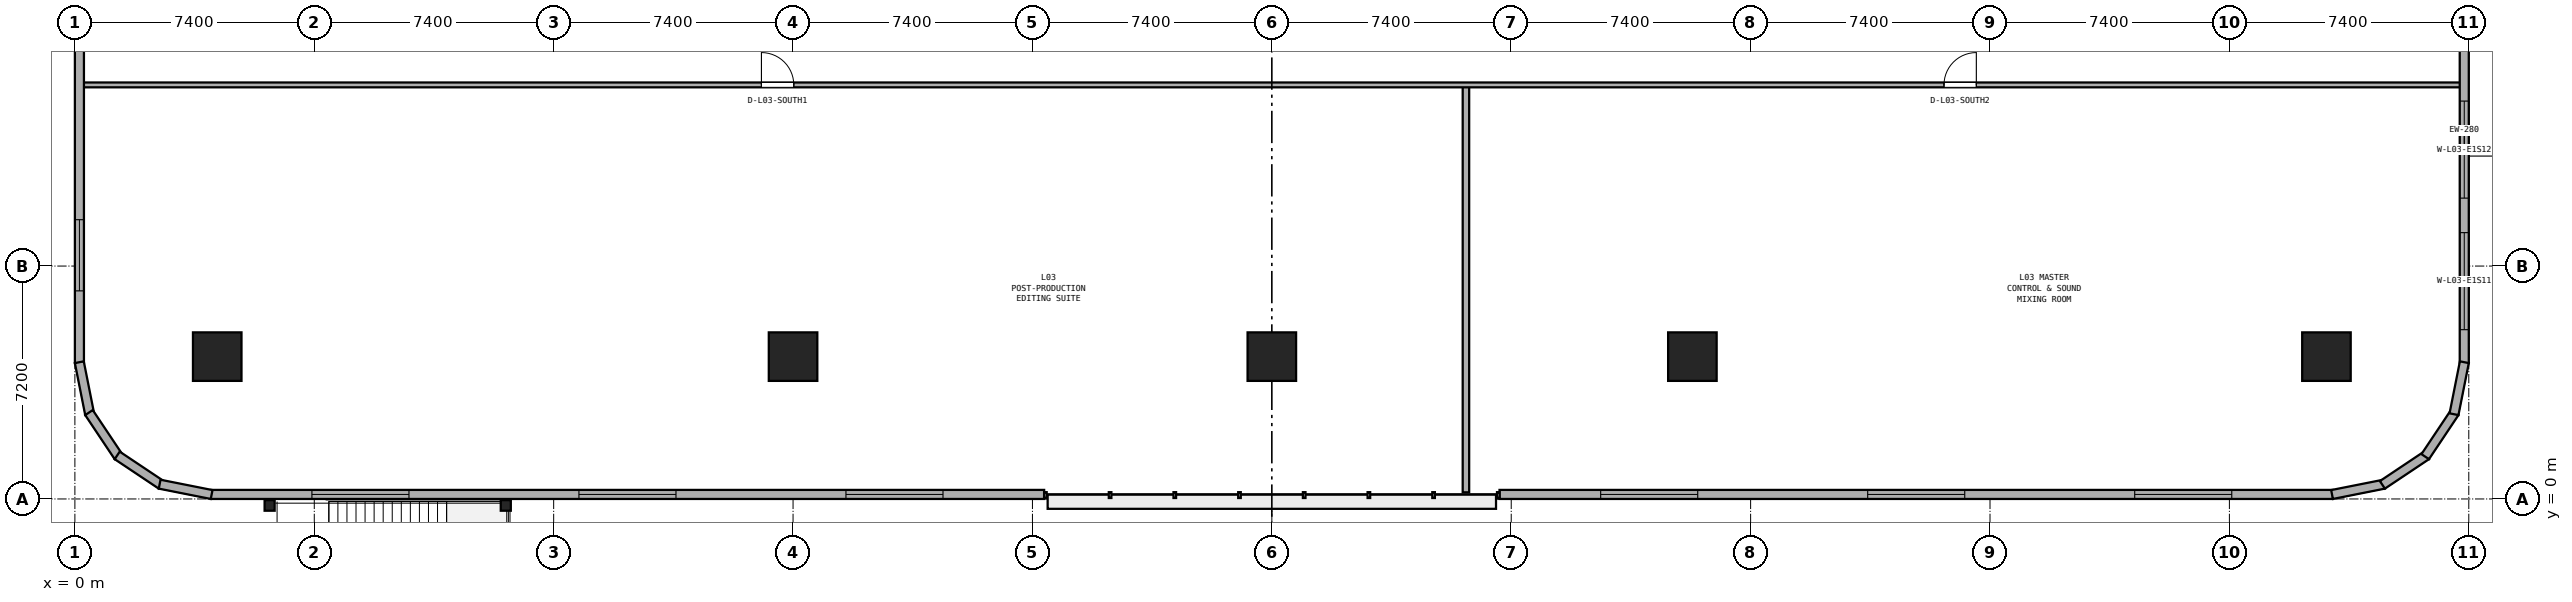
"""IFC4 building model, lengths in metres.
Left out: names, types, materials, properties, quantities, classifications, styles, units other than length and angle.
Written with IfcOpenShell. Run it as: python <this file> out.ifc"""

import sys

from ifc_helpers import new_model, si_unit, direction, frame, frame_2d, origin, origin_2d, place, context, subcontext, project, spatial, rectangle, i_section, extrude, element, fill, save


model = new_model("IFC4")
c1 = context("Model", 3, precision=1e-05, world=origin(), true_north=direction((0.0, 1.0)))
c2 = subcontext(c1, "Body", "Model", "MODEL_VIEW")
j1 = project(units=[si_unit("LENGTHUNIT", "METRE"), si_unit("PLANEANGLEUNIT", "RADIAN")], contexts=[c1])
p1 = place(None, origin())
s1 = spatial("IfcSite", under=j1, at=p1, CompositionType="ELEMENT")
p2 = place(p1, origin())
s2 = spatial("IfcBuilding", under=s1, at=p2, CompositionType="ELEMENT")
p3 = place(p2, frame((0.0, 0.0, 15.0)))
s3 = spatial("IfcBuildingStorey", under=s2, at=p3, CompositionType="ELEMENT", Elevation=15.0)
for number, where, z_axis, x_axis in (
    (1, (4.4, 4.4, 0.0), (0.0, 0.0, 1.0), (1.0, 0.0, 0.0)),
    (2, (22.2, 4.4, 0.0), (0.0, 0.0, 1.0), (1.0, 0.0, 0.0)),
    (3, (37.0, 4.4, 0.0), (0.0, 0.0, 1.0), (1.0, 0.0, 0.0)),
    (4, (50.0, 4.4, 0.0), (0.0, 0.0, 1.0), (1.0, 0.0, 0.0)),
    (5, (69.6, 4.4, 0.0), (0.0, 0.0, 1.0), (1.0, 0.0, 0.0)),
):
    element("IfcColumn", number, at=place(p3, frame(where, z_axis=z_axis, x_axis=x_axis)), inside=s3, PredefinedType="COLUMN", context=c2, shape_type="SweptSolid", body=[
        extrude(rectangle(XDim=1.5, YDim=1.5, at=origin_2d()), origin(), (0.0, 0.0, 1.0), 5.0),
    ])
for number, where, z_axis, x_axis in (
    (6, (6.02, -0.2, 0.0), (0.0, 0.0, 1.0), (1.0, 0.0, 0.0)),
    (7, (13.32, -0.2, 0.0), (0.0, 0.0, 1.0), (1.0, 0.0, 0.0)),
):
    element("IfcColumn", number, at=place(p3, frame(where, z_axis=z_axis, x_axis=x_axis)), inside=s3, PredefinedType="COLUMN", context=c2, shape_type="SweptSolid", body=[
        extrude(i_section(OverallWidth=0.311, OverallDepth=0.327, WebThickness=0.016, FlangeThickness=0.025, at=origin_2d()), origin(), (0.0, 0.0, 1.0), 5.0),
    ])
p4 = place(p3, frame((43.0, 0.205, 0.0), z_axis=(0.0, 0.0, 1.0), x_axis=(0.0, 1.0, 0.0)))
e8 = element("IfcWall", 8, at=p4, inside=s3, PredefinedType="PARTITIONING", context=c2, shape_type="SweptSolid", body=[
    extrude(rectangle(XDim=12.595, YDim=0.2, at=frame_2d((6.297, 0.0))), origin(), (0.0, 0.0, 1.0), 4.68),
])
p5 = place(p3, frame((0.205, 12.8, 0.0), z_axis=(0.0, 0.0, 1.0), x_axis=(1.0, 0.0, 0.0)))
e9 = element("IfcWall", 9, at=p5, inside=s3, PredefinedType="PARTITIONING", context=c2, shape_type="SweptSolid", body=[
    extrude(rectangle(XDim=73.59, YDim=0.15, at=frame_2d((36.795, 0.0))), origin(), (0.0, 0.0, 1.0), 4.68),
])
p6 = place(p5, frame((21.018, 0.0, 0.0)))
e10 = element("IfcOpeningElement", 10, at=p6, cuts=e9, PredefinedType="OPENING", context=c2, shape_type="SweptSolid", body=[
    extrude(rectangle(XDim=1.0, YDim=2.12, at=frame_2d((0.5, 1.06))), frame((0.0, 0.085, 0.0), z_axis=(0.0, -1.0, 0.0), x_axis=(1.0, 0.0, 0.0)), (0.0, 0.0, 1.0), 0.17),
])
p7 = place(p5, frame((57.573, 0.0, 0.0)))
e11 = element("IfcOpeningElement", 11, at=p7, cuts=e9, PredefinedType="OPENING", context=c2, shape_type="SweptSolid", body=[
    extrude(rectangle(XDim=1.0, YDim=2.12, at=frame_2d((0.5, 1.06))), frame((0.0, 0.085, 0.0), z_axis=(0.0, -1.0, 0.0), x_axis=(1.0, 0.0, 0.0)), (0.0, 0.0, 1.0), 0.17),
])
p8 = place(p3, frame((73.86, 4.2, 0.0), z_axis=(0.0, 0.0, 1.0), x_axis=(0.0, 1.0, 0.0)))
e12 = element("IfcWall", 12, at=p8, inside=s3, PredefinedType="STANDARD", context=c2, shape_type="SweptSolid", body=[
    extrude(rectangle(XDim=13.2, YDim=0.28, at=frame_2d((6.6, 0.0))), origin(), (0.0, 0.0, 1.0), 3.78),
])
p9 = place(p8, frame((1.033, 0.0, 0.9)))
e13 = element("IfcOpeningElement", 13, at=p9, cuts=e12, PredefinedType="OPENING", context=c2, shape_type="SweptSolid", body=[
    extrude(rectangle(XDim=3.0, YDim=2.2, at=frame_2d((1.5, 1.1))), frame((0.0, 0.15, 0.0), z_axis=(0.0, -1.0, 0.0), x_axis=(1.0, 0.0, 0.0)), (0.0, 0.0, 1.0), 0.3),
])
p10 = place(p8, frame((5.1, 0.0, 0.9)))
e14 = element("IfcOpeningElement", 14, at=p10, cuts=e12, PredefinedType="OPENING", context=c2, shape_type="SweptSolid", body=[
    extrude(rectangle(XDim=3.0, YDim=2.2, at=frame_2d((1.5, 1.1))), frame((0.0, 0.15, 0.0), z_axis=(0.0, -1.0, 0.0), x_axis=(1.0, 0.0, 0.0)), (0.0, 0.0, 1.0), 0.3),
])
p11 = place(p3, frame((0.14, 22.2, 0.0), z_axis=(0.0, 0.0, 1.0), x_axis=(0.0, -1.0, 0.0)))
e15 = element("IfcWall", 15, at=p11, inside=s3, PredefinedType="STANDARD", context=c2, shape_type="SweptSolid", body=[
    extrude(rectangle(XDim=18.0, YDim=0.28, at=frame_2d((9.0, 0.0))), origin(), (0.0, 0.0, 1.0), 3.78),
])
p12 = place(p11, frame((2.233, 0.0, 0.9)))
e16 = element("IfcOpeningElement", 16, at=p12, cuts=e15, PredefinedType="OPENING", context=c2, shape_type="SweptSolid", body=[
    extrude(rectangle(XDim=2.2, YDim=1.95, at=frame_2d((1.1, 0.975))), frame((0.0, 0.15, 0.0), z_axis=(0.0, -1.0, 0.0), x_axis=(1.0, 0.0, 0.0)), (0.0, 0.0, 1.0), 0.3),
])
p13 = place(p11, frame((13.567, 0.0, 0.9)))
e17 = element("IfcOpeningElement", 17, at=p13, cuts=e15, PredefinedType="OPENING", context=c2, shape_type="SweptSolid", body=[
    extrude(rectangle(XDim=2.2, YDim=1.95, at=frame_2d((1.1, 0.975))), frame((0.0, 0.15, 0.0), z_axis=(0.0, -1.0, 0.0), x_axis=(1.0, 0.0, 0.0)), (0.0, 0.0, 1.0), 0.3),
])
p14 = place(p3, frame((4.2, 0.14, 0.0), z_axis=(0.0, 0.0, 1.0), x_axis=(1.0, 0.0, 0.0)))
e18 = element("IfcWall", 18, at=p14, inside=s3, PredefinedType="STANDARD", context=c2, shape_type="SweptSolid", body=[
    extrude(rectangle(XDim=25.762, YDim=0.28, at=frame_2d((12.881, 0.0))), origin(), (0.0, 0.0, 1.0), 4.68),
])
p15 = place(p14, frame((3.127, 0.0, 0.9)))
e19 = element("IfcOpeningElement", 19, at=p15, cuts=e18, PredefinedType="OPENING", context=c2, shape_type="SweptSolid", body=[
    extrude(rectangle(XDim=3.0, YDim=2.2, at=frame_2d((1.5, 1.1))), frame((0.0, 0.15, 0.0), z_axis=(0.0, -1.0, 0.0), x_axis=(1.0, 0.0, 0.0)), (0.0, 0.0, 1.0), 0.3),
])
p16 = place(p14, frame((11.381, 0.0, 0.9)))
e20 = element("IfcOpeningElement", 20, at=p16, cuts=e18, PredefinedType="OPENING", context=c2, shape_type="SweptSolid", body=[
    extrude(rectangle(XDim=3.0, YDim=2.2, at=frame_2d((1.5, 1.1))), frame((0.0, 0.15, 0.0), z_axis=(0.0, -1.0, 0.0), x_axis=(1.0, 0.0, 0.0)), (0.0, 0.0, 1.0), 0.3),
])
p17 = place(p14, frame((19.635, 0.0, 0.9)))
e21 = element("IfcOpeningElement", 21, at=p17, cuts=e18, PredefinedType="OPENING", context=c2, shape_type="SweptSolid", body=[
    extrude(rectangle(XDim=3.0, YDim=2.2, at=frame_2d((1.5, 1.1))), frame((0.0, 0.15, 0.0), z_axis=(0.0, -1.0, 0.0), x_axis=(1.0, 0.0, 0.0)), (0.0, 0.0, 1.0), 0.3),
])
p18 = place(p3, frame((44.038, 0.14, 0.0), z_axis=(0.0, 0.0, 1.0), x_axis=(1.0, 0.0, 0.0)))
e22 = element("IfcWall", 22, at=p18, inside=s3, PredefinedType="STANDARD", context=c2, shape_type="SweptSolid", body=[
    extrude(rectangle(XDim=25.762, YDim=0.28, at=frame_2d((12.881, 0.0))), origin(), (0.0, 0.0, 1.0), 4.68),
])
p19 = place(p18, frame((3.127, 0.0, 0.9)))
e23 = element("IfcOpeningElement", 23, at=p19, cuts=e22, PredefinedType="OPENING", context=c2, shape_type="SweptSolid", body=[
    extrude(rectangle(XDim=3.0, YDim=2.2, at=frame_2d((1.5, 1.1))), frame((0.0, 0.15, 0.0), z_axis=(0.0, -1.0, 0.0), x_axis=(1.0, 0.0, 0.0)), (0.0, 0.0, 1.0), 0.3),
])
p20 = place(p18, frame((11.381, 0.0, 0.9)))
e24 = element("IfcOpeningElement", 24, at=p20, cuts=e22, PredefinedType="OPENING", context=c2, shape_type="SweptSolid", body=[
    extrude(rectangle(XDim=3.0, YDim=2.2, at=frame_2d((1.5, 1.1))), frame((0.0, 0.15, 0.0), z_axis=(0.0, -1.0, 0.0), x_axis=(1.0, 0.0, 0.0)), (0.0, 0.0, 1.0), 0.3),
])
p21 = place(p18, frame((19.635, 0.0, 0.9)))
e25 = element("IfcOpeningElement", 25, at=p21, cuts=e22, PredefinedType="OPENING", context=c2, shape_type="SweptSolid", body=[
    extrude(rectangle(XDim=3.0, YDim=2.2, at=frame_2d((1.5, 1.1))), frame((0.0, 0.15, 0.0), z_axis=(0.0, -1.0, 0.0), x_axis=(1.0, 0.0, 0.0)), (0.0, 0.0, 1.0), 0.3),
])
for number, where, z_axis, x_axis in (
    (26, (0.137, 4.227, 0.0), (0.0, 0.0, 1.0), (0.195, -0.981, 0.0)),
    (27, (0.436, 2.67, 0.0), (0.0, 0.0, 1.0), (0.556, -0.831, 0.0)),
    (28, (1.308, 1.347, 0.0), (0.0, 0.0, 1.0), (0.831, -0.556, 0.0)),
    (29, (2.62, 0.457, 0.0), (0.0, 0.0, 1.0), (0.981, -0.195, 0.0)),
    (30, (69.773, 0.137, 0.0), (0.0, 0.0, 1.0), (0.981, 0.195, 0.0)),
    (31, (71.33, 0.436, 0.0), (0.0, 0.0, 1.0), (0.831, 0.556, 0.0)),
    (32, (72.653, 1.308, 0.0), (0.0, 0.0, 1.0), (0.556, 0.831, 0.0)),
    (33, (73.543, 2.62, 0.0), (0.0, 0.0, 1.0), (0.195, 0.981, 0.0)),
):
    element("IfcWall", number, at=place(p3, frame(where, z_axis=z_axis, x_axis=x_axis)), inside=s3, PredefinedType="STANDARD", context=c2, shape_type="SweptSolid", body=[
        extrude(rectangle(XDim=1.639, YDim=0.28, at=frame_2d((0.819, 0.0))), origin(), (0.0, 0.0, 1.0), 4.68),
    ])
p22 = place(p6, origin())
e34 = element("IfcDoor", 34, at=p22, inside=s3, OperationType="SINGLE_SWING_LEFT", PredefinedType="DOOR", context=c2, shape_type="SweptSolid", body=[
    extrude(rectangle(XDim=1.0, YDim=2.12, at=frame_2d((0.5, 1.06))), frame((0.0, 0.025, 0.0), z_axis=(0.0, -1.0, 0.0), x_axis=(1.0, 0.0, 0.0)), (0.0, 0.0, 1.0), 0.05),
])
fill(e10, e34)
p23 = place(p7, origin())
e35 = element("IfcDoor", 35, at=p23, inside=s3, OperationType="SINGLE_SWING_RIGHT", PredefinedType="DOOR", context=c2, shape_type="SweptSolid", body=[
    extrude(rectangle(XDim=1.0, YDim=2.12, at=frame_2d((0.5, 1.06))), frame((0.0, 0.025, 0.0), z_axis=(0.0, -1.0, 0.0), x_axis=(1.0, 0.0, 0.0)), (0.0, 0.0, 1.0), 0.05),
])
fill(e11, e35)
p24 = place(p9, origin())
e36 = element("IfcWindow", 36, at=p24, inside=s3, PartitioningType="SINGLE_PANEL", PredefinedType="WINDOW", context=c2, shape_type="SweptSolid", body=[
    extrude(rectangle(XDim=3.0, YDim=2.2, at=frame_2d((1.5, 1.1))), frame((0.0, 0.03, 0.0), z_axis=(0.0, -1.0, 0.0), x_axis=(1.0, 0.0, 0.0)), (0.0, 0.0, 1.0), 0.06),
])
fill(e13, e36)
p25 = place(p10, origin())
e37 = element("IfcWindow", 37, at=p25, inside=s3, PartitioningType="SINGLE_PANEL", PredefinedType="WINDOW", context=c2, shape_type="SweptSolid", body=[
    extrude(rectangle(XDim=3.0, YDim=2.2, at=frame_2d((1.5, 1.1))), frame((0.0, 0.03, 0.0), z_axis=(0.0, -1.0, 0.0), x_axis=(1.0, 0.0, 0.0)), (0.0, 0.0, 1.0), 0.06),
])
fill(e14, e37)
p26 = place(p13, origin())
e38 = element("IfcWindow", 38, at=p26, inside=s3, PartitioningType="SINGLE_PANEL", PredefinedType="WINDOW", context=c2, shape_type="SweptSolid", body=[
    extrude(rectangle(XDim=2.2, YDim=1.95, at=frame_2d((1.1, 0.975))), frame((0.0, 0.03, 0.0), z_axis=(0.0, -1.0, 0.0), x_axis=(1.0, 0.0, 0.0)), (0.0, 0.0, 1.0), 0.06),
])
fill(e17, e38)
p27 = place(p15, origin())
e39 = element("IfcWindow", 39, at=p27, inside=s3, PartitioningType="SINGLE_PANEL", PredefinedType="WINDOW", context=c2, shape_type="SweptSolid", body=[
    extrude(rectangle(XDim=3.0, YDim=2.2, at=frame_2d((1.5, 1.1))), frame((0.0, 0.03, 0.0), z_axis=(0.0, -1.0, 0.0), x_axis=(1.0, 0.0, 0.0)), (0.0, 0.0, 1.0), 0.06),
])
fill(e19, e39)
p28 = place(p16, origin())
e40 = element("IfcWindow", 40, at=p28, inside=s3, PartitioningType="SINGLE_PANEL", PredefinedType="WINDOW", context=c2, shape_type="SweptSolid", body=[
    extrude(rectangle(XDim=3.0, YDim=2.2, at=frame_2d((1.5, 1.1))), frame((0.0, 0.03, 0.0), z_axis=(0.0, -1.0, 0.0), x_axis=(1.0, 0.0, 0.0)), (0.0, 0.0, 1.0), 0.06),
])
fill(e20, e40)
p29 = place(p17, origin())
e41 = element("IfcWindow", 41, at=p29, inside=s3, PartitioningType="SINGLE_PANEL", PredefinedType="WINDOW", context=c2, shape_type="SweptSolid", body=[
    extrude(rectangle(XDim=3.0, YDim=2.2, at=frame_2d((1.5, 1.1))), frame((0.0, 0.03, 0.0), z_axis=(0.0, -1.0, 0.0), x_axis=(1.0, 0.0, 0.0)), (0.0, 0.0, 1.0), 0.06),
])
fill(e21, e41)
p30 = place(p19, origin())
e42 = element("IfcWindow", 42, at=p30, inside=s3, PartitioningType="SINGLE_PANEL", PredefinedType="WINDOW", context=c2, shape_type="SweptSolid", body=[
    extrude(rectangle(XDim=3.0, YDim=2.2, at=frame_2d((1.5, 1.1))), frame((0.0, 0.03, 0.0), z_axis=(0.0, -1.0, 0.0), x_axis=(1.0, 0.0, 0.0)), (0.0, 0.0, 1.0), 0.06),
])
fill(e23, e42)
p31 = place(p20, origin())
e43 = element("IfcWindow", 43, at=p31, inside=s3, PartitioningType="SINGLE_PANEL", PredefinedType="WINDOW", context=c2, shape_type="SweptSolid", body=[
    extrude(rectangle(XDim=3.0, YDim=2.2, at=frame_2d((1.5, 1.1))), frame((0.0, 0.03, 0.0), z_axis=(0.0, -1.0, 0.0), x_axis=(1.0, 0.0, 0.0)), (0.0, 0.0, 1.0), 0.06),
])
fill(e24, e43)
p32 = place(p21, origin())
e44 = element("IfcWindow", 44, at=p32, inside=s3, PartitioningType="SINGLE_PANEL", PredefinedType="WINDOW", context=c2, shape_type="SweptSolid", body=[
    extrude(rectangle(XDim=3.0, YDim=2.2, at=frame_2d((1.5, 1.1))), frame((0.0, 0.03, 0.0), z_axis=(0.0, -1.0, 0.0), x_axis=(1.0, 0.0, 0.0)), (0.0, 0.0, 1.0), 0.06),
])
fill(e25, e44)
save(model, sys.argv[1])
